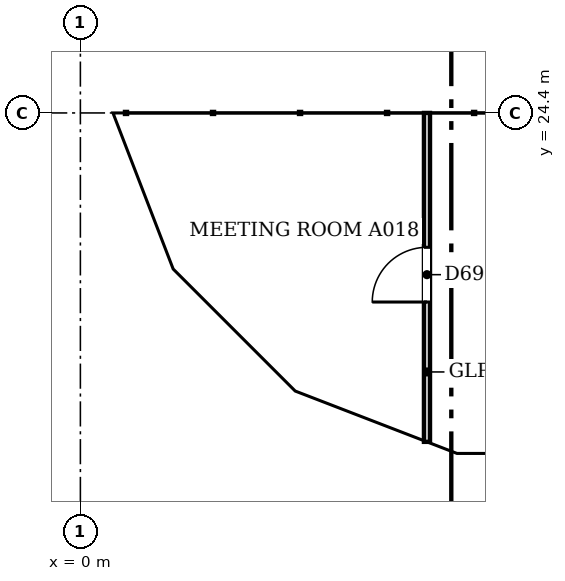
"""IFC4 building model, lengths in metres.
Left out: names, types, materials, properties, quantities, classifications, styles, units other than length and angle.
Written with IfcOpenShell. Run it as: python <this file> out.ifc"""

import sys

from ifc_helpers import new_model, si_unit, direction, frame, frame_2d, origin, place, context, subcontext, project, spatial, polyline, rectangle, outline, extrude, faceted_brep, source, transform, mapped, element, fill, save


model = new_model("IFC4")
c1 = context("Model", 3, precision=1e-05, world=origin(), true_north=direction((0.0, 1.0)))
c2 = subcontext(c1, "Body", "Model", "MODEL_VIEW")
j1 = project(units=[si_unit("LENGTHUNIT", "METRE"), si_unit("PLANEANGLEUNIT", "RADIAN")], contexts=[c1])
p1 = place(None, origin())
s1 = spatial("IfcSite", under=j1, at=p1, CompositionType="ELEMENT")
p2 = place(p1, origin())
s2 = spatial("IfcBuilding", under=s1, at=p2, CompositionType="ELEMENT")
p3 = place(p2, frame((0.0, 0.0, 91.4)))
s3 = spatial("IfcBuildingStorey", under=s2, at=p3, CompositionType="ELEMENT", Elevation=91.4)
m1 = source(origin(), c2, "Body", "Brep", [
    faceted_brep([(3.05, -0.25, 0.0), (6.053, -0.25, 3.8), (3.05, -0.25, 7.6), (0.0, -0.25, 3.8), (0.0, 0.25, 3.8), (3.05, 0.25, 7.6), (6.007, 0.25, 3.859), (6.007, 0.25, 3.741), (3.05, 0.25, 0.0), (6.053, 0.0, 3.8)], [[[0, 1, 2, 3]], [[4, 5, 6, 7, 8]], [[8, 7, 9, 1, 0]], [[6, 5, 2, 1, 9]], [[5, 4, 3, 2]], [[4, 8, 0, 3]], [[9, 7, 6]]]),
])
p4 = place(p3, frame((0.25, 30.5, -3.8), z_axis=(0.0, 0.0, 1.0), x_axis=(0.0, -1.0, 0.0)))
e1 = element("IfcWall", 1, at=p4, inside=s3, PredefinedType="SOLIDWALL", context=c2, shape_type="MappedRepresentation", body=[
    mapped(m1, transform((0.0, 0.0, 0.0), scale=1.0)),
])
m2 = source(origin(), c2, "Body", "SweptSolid", [
    extrude(outline(polyline([(3.049, 0.401), (5.735, 3.8), (3.049, 7.199), (0.321, 3.8), (3.049, 0.401)])), frame((0.0, 0.26, 0.0), z_axis=(0.0, -1.0, 0.0), x_axis=(1.0, 0.0, 0.0)), (0.0, 0.0, 1.0), 0.52),
])
p5 = place(p4, origin())
e2 = element("IfcOpeningElement", 2, at=p5, cuts=e1, PredefinedType="OPENING", context=c2, shape_type="MappedRepresentation", body=[
    mapped(m2, transform((0.0, 0.0, 0.0), scale=1.0)),
])
m3 = source(origin(), c2, "Body", "Brep", [
    faceted_brep([(2.95, -0.25, 0.0), (3.003, -0.25, 0.068), (3.003, -0.25, 7.531), (2.95, -0.25, 7.6), (0.0, -0.25, 3.8), (0.047, 0.25, 3.86), (2.898, 0.25, 7.532), (2.898, 0.25, 0.068), (0.047, 0.25, 3.74), (2.95, 0.0, 0.0), (2.95, 0.0, 7.6), (0.0, 0.0, 3.8)], [[[0, 1, 2, 3, 4]], [[5, 6, 7, 8]], [[1, 0, 9]], [[10, 3, 2]], [[6, 5, 11, 4, 3, 10]], [[8, 7, 9, 0, 4, 11]], [[8, 11, 5]], [[1, 9, 7, 6, 10, 2]]]),
])
p6 = place(p3, frame((0.25, 24.447, -3.8), z_axis=(0.0, 0.0, 1.0), x_axis=(0.35992665181, -0.932980602862, 0.0)))
e3 = element("IfcWall", 3, at=p6, inside=s3, PredefinedType="SOLIDWALL", context=c2, shape_type="MappedRepresentation", body=[
    mapped(m3, transform((0.0, 0.0, 0.0), scale=1.0)),
])
m4 = source(origin(), c2, "Body", "SweptSolid", [
    extrude(outline(polyline([(2.75, 6.935), (0.316, 3.8), (2.75, 0.665), (2.75, 6.935)])), frame((0.0, 0.26, 0.0), z_axis=(0.0, -1.0, 0.0), x_axis=(1.0, 0.0, 0.0)), (0.0, 0.0, 1.0), 0.52),
])
p7 = place(p6, origin())
e4 = element("IfcOpeningElement", 4, at=p7, cuts=e3, PredefinedType="OPENING", context=c2, shape_type="MappedRepresentation", body=[
    mapped(m4, transform((0.0, 0.0, 0.0), scale=1.0)),
])
m5 = source(origin(), c2, "Body", "Brep", [
    faceted_brep([(0.053, -0.25, 0.0), (2.997, -0.25, 3.8), (0.053, -0.25, 7.6), (0.0, -0.25, 7.532), (0.0, -0.25, 0.068), (0.106, 0.25, 7.531), (2.944, 0.25, 3.868), (2.944, 0.25, 3.732), (0.106, 0.25, 0.068), (2.997, 0.0, 3.8), (0.053, 0.0, 0.0), (0.053, 0.0, 7.6)], [[[0, 1, 2, 3, 4]], [[5, 6, 7, 8]], [[8, 7, 9, 1, 0, 10]], [[6, 5, 11, 2, 1, 9]], [[3, 2, 11]], [[10, 0, 4]], [[8, 10, 4, 3, 11, 5]], [[9, 7, 6]]]),
])
p8 = place(p3, frame((1.274, 21.731, -3.8), z_axis=(0.0, 0.0, 1.0), x_axis=(0.707147509625, -0.707066050402, 0.0)))
e5 = element("IfcWall", 5, at=p8, inside=s3, PredefinedType="SOLIDWALL", context=c2, shape_type="MappedRepresentation", body=[
    mapped(m5, transform((0.0, 0.0, 0.0), scale=1.0)),
])
m6 = source(origin(), c2, "Body", "SweptSolid", [
    extrude(outline(polyline([(0.253, 0.666), (2.681, 3.8), (0.253, 6.934), (0.253, 0.666)])), frame((0.0, 0.26, 0.0), z_axis=(0.0, -1.0, 0.0), x_axis=(1.0, 0.0, 0.0)), (0.0, 0.0, 1.0), 0.52),
])
p9 = place(p8, origin())
e6 = element("IfcOpeningElement", 6, at=p9, cuts=e5, PredefinedType="OPENING", context=c2, shape_type="MappedRepresentation", body=[
    mapped(m6, transform((0.0, 0.0, 0.0), scale=1.0)),
])
m7 = source(origin(), c2, "Body", "Brep", [
    faceted_brep([(2.95, -0.25, 0.0), (2.997, -0.25, 0.059), (2.997, -0.25, 7.541), (2.95, -0.25, 7.6), (0.0, -0.25, 3.8), (0.053, 0.25, 3.868), (2.904, 0.25, 7.54), (2.904, 0.25, 0.06), (0.053, 0.25, 3.732), (2.95, 0.0, 0.0), (2.95, 0.0, 7.6), (0.0, 0.0, 3.8)], [[[0, 1, 2, 3, 4]], [[5, 6, 7, 8]], [[1, 0, 9]], [[10, 3, 2]], [[6, 5, 11, 4, 3, 10]], [[8, 7, 9, 0, 4, 11]], [[8, 11, 5]], [[1, 9, 7, 6, 10, 2]]]),
])
p10 = place(p3, frame((3.394, 19.612, -3.8), z_axis=(0.0, 0.0, 1.0), x_axis=(0.932990326376, -0.359901446078, 0.0)))
e7 = element("IfcWall", 7, at=p10, inside=s3, PredefinedType="SOLIDWALL", context=c2, shape_type="MappedRepresentation", body=[
    mapped(m7, transform((0.0, 0.0, 0.0), scale=1.0)),
])
p11 = place(p10, origin())
e8 = element("IfcOpeningElement", 8, at=p11, cuts=e7, PredefinedType="OPENING", context=c2, shape_type="MappedRepresentation", body=[
    mapped(m4, transform((0.0, 0.0, 0.0), scale=1.0)),
])
m8 = source(origin(), c2, "Body", "Brep", [
    faceted_brep([(0.047, -0.25, 0.0), (3.05, -0.25, 3.8), (0.047, -0.25, 7.6), (0.0, -0.25, 7.54), (0.0, -0.25, 0.06), (0.093, 0.25, 7.541), (3.05, 0.25, 3.8), (0.093, 0.25, 0.059), (0.047, 0.0, 0.0), (0.047, 0.0, 7.6)], [[[0, 1, 2, 3, 4]], [[5, 6, 7]], [[7, 6, 1, 0, 8]], [[6, 5, 9, 2, 1]], [[3, 2, 9]], [[8, 0, 4]], [[7, 8, 4, 3, 9, 5]]]),
])
p12 = place(p3, frame((6.1, 18.55, -3.8), z_axis=(0.0, 0.0, 1.0), x_axis=(1.0, 0.0, 0.0)))
e9 = element("IfcWall", 9, at=p12, inside=s3, PredefinedType="SOLIDWALL", context=c2, shape_type="MappedRepresentation", body=[
    mapped(m8, transform((0.0, 0.0, 0.0), scale=1.0)),
])
m9 = source(origin(), c2, "Body", "SweptSolid", [
    extrude(outline(polyline([(0.247, 0.656), (2.731, 3.8), (0.247, 6.944), (0.247, 0.656)])), frame((0.0, 0.26, 0.0), z_axis=(0.0, -1.0, 0.0), x_axis=(1.0, 0.0, 0.0)), (0.0, 0.0, 1.0), 0.52),
])
p13 = place(p12, origin())
e10 = element("IfcOpeningElement", 10, at=p13, cuts=e9, PredefinedType="OPENING", context=c2, shape_type="MappedRepresentation", body=[
    mapped(m9, transform((0.0, 0.0, 0.0), scale=1.0)),
])
p14 = place(p2, frame((0.0, 0.0, 95.2)))
s4 = spatial("IfcBuildingStorey", under=s2, at=p14, CompositionType="ELEMENT", Elevation=95.2)
m10 = source(origin(), c2, "Body", "Brep", [
    faceted_brep([(3.003, -0.25, 0.0), (3.05, -0.25, 0.06), (3.05, -0.25, 7.54), (3.003, -0.25, 7.6), (0.0, -0.25, 3.8), (0.0, 0.25, 3.8), (2.957, 0.25, 7.541), (2.957, 0.25, 0.059), (3.003, 0.0, 0.0), (3.003, 0.0, 7.6)], [[[0, 1, 2, 3, 4]], [[5, 6, 7]], [[1, 0, 8]], [[9, 3, 2]], [[6, 5, 4, 3, 9]], [[5, 7, 8, 0, 4]], [[1, 8, 7, 6, 9, 2]]]),
])
p15 = place(p14, frame((0.25, 27.45, -3.8), z_axis=(0.0, 0.0, 1.0), x_axis=(0.0, -1.0, 0.0)))
e11 = element("IfcWall", 11, at=p15, inside=s4, PredefinedType="SOLIDWALL", context=c2, shape_type="MappedRepresentation", body=[
    mapped(m10, transform((0.0, 0.0, 0.0), scale=1.0)),
])
m11 = source(origin(), c2, "Body", "SweptSolid", [
    extrude(outline(polyline([(2.803, 6.944), (0.319, 3.8), (2.803, 0.656), (2.803, 6.944)])), frame((0.0, 0.26, 0.0), z_axis=(0.0, -1.0, 0.0), x_axis=(1.0, 0.0, 0.0)), (0.0, 0.0, 1.0), 0.52),
])
p16 = place(p15, origin())
e12 = element("IfcOpeningElement", 12, at=p16, cuts=e11, PredefinedType="OPENING", context=c2, shape_type="MappedRepresentation", body=[
    mapped(m11, transform((0.0, 0.0, 0.0), scale=1.0)),
])
m12 = source(origin(), c2, "Body", "Brep", [
    faceted_brep([(0.047, -0.25, 0.0), (2.997, -0.25, 3.8), (0.047, -0.25, 7.6), (0.0, -0.25, 7.541), (0.0, -0.25, 0.059), (0.093, 0.25, 7.54), (2.944, 0.25, 3.868), (2.944, 0.25, 3.732), (0.093, 0.25, 0.06), (2.997, 0.0, 3.8), (0.047, 0.0, 0.0), (0.047, 0.0, 7.6)], [[[0, 1, 2, 3, 4]], [[5, 6, 7, 8]], [[8, 7, 9, 1, 0, 10]], [[6, 5, 11, 2, 1, 9]], [[3, 2, 11]], [[10, 0, 4]], [[8, 10, 4, 3, 11, 5]], [[9, 7, 6]]]),
])
p17 = place(p14, frame((0.233, 24.49, -3.8), z_axis=(0.0, 0.0, 1.0), x_axis=(0.359901446078, -0.932990326376, 0.0)))
e13 = element("IfcWall", 13, at=p17, inside=s4, PredefinedType="SOLIDWALL", context=c2, shape_type="MappedRepresentation", body=[
    mapped(m12, transform((0.0, 0.0, 0.0), scale=1.0)),
])
m13 = source(origin(), c2, "Body", "SweptSolid", [
    extrude(outline(polyline([(0.247, 0.665), (2.681, 3.8), (0.247, 6.935), (0.247, 0.665)])), frame((0.0, 0.26, 0.0), z_axis=(0.0, -1.0, 0.0), x_axis=(1.0, 0.0, 0.0)), (0.0, 0.0, 1.0), 0.52),
])
p18 = place(p17, origin())
e14 = element("IfcOpeningElement", 14, at=p18, cuts=e13, PredefinedType="OPENING", context=c2, shape_type="MappedRepresentation", body=[
    mapped(m13, transform((0.0, 0.0, 0.0), scale=1.0)),
])
m14 = source(origin(), c2, "Body", "Brep", [
    faceted_brep([(2.944, -0.25, 0.0), (2.997, -0.25, 0.068), (2.997, -0.25, 7.532), (2.944, -0.25, 7.6), (0.0, -0.25, 3.8), (0.053, 0.25, 3.868), (2.891, 0.25, 7.532), (2.891, 0.25, 0.068), (0.053, 0.25, 3.732), (2.944, 0.0, 0.0), (2.944, 0.0, 7.6), (0.0, 0.0, 3.8)], [[[0, 1, 2, 3, 4]], [[5, 6, 7, 8]], [[1, 0, 9]], [[10, 3, 2]], [[6, 5, 11, 4, 3, 10]], [[8, 7, 9, 0, 4, 11]], [[8, 11, 5]], [[1, 9, 7, 6, 10, 2]]]),
])
p19 = place(p14, frame((1.312, 21.694, -3.8), z_axis=(0.0, 0.0, 1.0), x_axis=(0.707066050402, -0.707147509625, 0.0)))
e15 = element("IfcWall", 15, at=p19, inside=s4, PredefinedType="SOLIDWALL", context=c2, shape_type="MappedRepresentation", body=[
    mapped(m14, transform((0.0, 0.0, 0.0), scale=1.0)),
])
m15 = source(origin(), c2, "Body", "SweptSolid", [
    extrude(outline(polyline([(2.744, 6.934), (0.316, 3.8), (2.744, 0.667), (2.744, 6.934)])), frame((0.0, 0.26, 0.0), z_axis=(0.0, -1.0, 0.0), x_axis=(1.0, 0.0, 0.0)), (0.0, 0.0, 1.0), 0.52),
])
p20 = place(p19, origin())
e16 = element("IfcOpeningElement", 16, at=p20, cuts=e15, PredefinedType="OPENING", context=c2, shape_type="MappedRepresentation", body=[
    mapped(m15, transform((0.0, 0.0, 0.0), scale=1.0)),
])
m16 = source(origin(), c2, "Body", "Brep", [
    faceted_brep([(0.053, -0.25, 0.0), (3.003, -0.25, 3.8), (0.053, -0.25, 7.6), (0.0, -0.25, 7.532), (0.0, -0.25, 0.068), (0.106, 0.25, 7.532), (2.957, 0.25, 3.86), (2.957, 0.25, 3.74), (0.106, 0.25, 0.068), (3.003, 0.0, 3.8), (0.053, 0.0, 0.0), (0.053, 0.0, 7.6)], [[[0, 1, 2, 3, 4]], [[5, 6, 7, 8]], [[8, 7, 9, 1, 0, 10]], [[6, 5, 11, 2, 1, 9]], [[3, 2, 11]], [[10, 0, 4]], [[8, 10, 4, 3, 11, 5]], [[9, 7, 6]]]),
])
p21 = place(p14, frame((3.344, 19.631, -3.8), z_axis=(0.0, 0.0, 1.0), x_axis=(0.933007896601, -0.359855894603, 0.0)))
e17 = element("IfcWall", 17, at=p21, inside=s4, PredefinedType="SOLIDWALL", context=c2, shape_type="MappedRepresentation", body=[
    mapped(m16, transform((0.0, 0.0, 0.0), scale=1.0)),
])
m17 = source(origin(), c2, "Body", "SweptSolid", [
    extrude(outline(polyline([(0.253, 0.665), (2.687, 3.8), (0.253, 6.935), (0.253, 0.665)])), frame((0.0, 0.26, 0.0), z_axis=(0.0, -1.0, 0.0), x_axis=(1.0, 0.0, 0.0)), (0.0, 0.0, 1.0), 0.52),
])
p22 = place(p21, origin())
e18 = element("IfcOpeningElement", 18, at=p22, cuts=e17, PredefinedType="OPENING", context=c2, shape_type="MappedRepresentation", body=[
    mapped(m17, transform((0.0, 0.0, 0.0), scale=1.0)),
])
m18 = source(origin(), c2, "Body", "Brep", [
    faceted_brep([(3.003, -0.25, 0.0), (6.053, -0.25, 3.8), (3.003, -0.25, 7.6), (0.0, -0.25, 3.8), (0.047, 0.25, 3.859), (3.003, 0.25, 7.6), (6.053, 0.25, 3.8), (3.003, 0.25, 0.0), (0.047, 0.25, 3.741), (0.0, 0.0, 3.8)], [[[0, 1, 2, 3]], [[4, 5, 6, 7, 8]], [[7, 6, 1, 0]], [[6, 5, 2, 1]], [[5, 4, 9, 3, 2]], [[8, 7, 0, 3, 9]], [[8, 9, 4]]]),
])
p23 = place(p14, frame((6.146, 18.55, -3.8), z_axis=(0.0, 0.0, 1.0), x_axis=(1.0, 0.0, 0.0)))
e19 = element("IfcWall", 19, at=p23, inside=s4, PredefinedType="SOLIDWALL", context=c2, shape_type="MappedRepresentation", body=[
    mapped(m18, transform((0.0, 0.0, 0.0), scale=1.0)),
])
m19 = source(origin(), c2, "Body", "SweptSolid", [
    extrude(outline(polyline([(3.005, 0.401), (5.733, 3.8), (3.005, 7.199), (0.319, 3.8), (3.005, 0.401)])), frame((0.0, 0.26, 0.0), z_axis=(0.0, -1.0, 0.0), x_axis=(1.0, 0.0, 0.0)), (0.0, 0.0, 1.0), 0.52),
])
p24 = place(p23, origin())
e20 = element("IfcOpeningElement", 20, at=p24, cuts=e19, PredefinedType="OPENING", context=c2, shape_type="MappedRepresentation", body=[
    mapped(m19, transform((0.0, 0.0, 0.0), scale=1.0)),
])
p25 = place(p3, frame((5.7, 18.99, 0.0), z_axis=(0.0, 0.0, 1.0), x_axis=(0.0, 1.0, 0.0)))
e21 = element("IfcWall", 21, at=p25, inside=s3, PredefinedType="PARTITIONING", context=c2, shape_type="SweptSolid", body=[
    extrude(rectangle(XDim=5.41, YDim=0.1, at=frame_2d((2.705, 0.0))), origin(), (0.0, 0.0, 1.0), 2.895),
])
m20 = source(origin(), c2, "Body", "SweptSolid", [
    extrude(rectangle(XDim=0.9, YDim=2.1, at=frame_2d((0.45, 1.05))), frame((0.0, 0.06, 0.0), z_axis=(0.0, -1.0, 0.0), x_axis=(1.0, 0.0, 0.0)), (0.0, 0.0, 1.0), 0.12),
])
p26 = place(p25, frame((2.3, 0.0, 0.0)))
e22 = element("IfcOpeningElement", 22, at=p26, cuts=e21, PredefinedType="OPENING", context=c2, shape_type="MappedRepresentation", body=[
    mapped(m20, transform((0.0, 0.0, 0.0), scale=1.0)),
])
m21 = source(origin(), c2, "Body", "SweptSolid", [
    extrude(rectangle(XDim=0.9, YDim=2.1, at=frame_2d((0.45, 1.05))), frame((0.0, 0.025, 0.0), z_axis=(0.0, -1.0, 0.0), x_axis=(1.0, 0.0, 0.0)), (0.0, 0.0, 1.0), 0.05),
])
p27 = place(p26, origin())
e23 = element("IfcDoor", 23, at=p27, inside=s3, OperationType="SINGLE_SWING_LEFT", PredefinedType="DOOR", context=c2, shape_type="MappedRepresentation", body=[
    mapped(m21, transform((0.0, 0.0, 0.0), scale=1.0)),
])
fill(e22, e23)
save(model, sys.argv[1])
